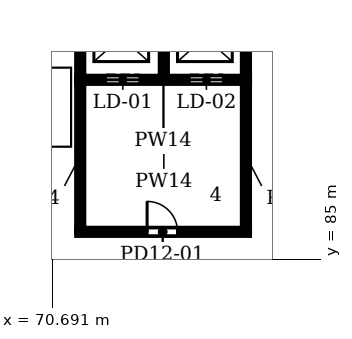
"""IFC4 building model, lengths in metres.
Left out: names, types, materials, properties, quantities, classifications, styles, units other than length and angle.
Written with IfcOpenShell. Run it as: python <this file> out.ifc"""

import sys

from ifc_helpers import new_model, si_unit, direction, frame, frame_2d, origin, place, context, subcontext, project, spatial, rectangle, extrude, element, fill, save


model = new_model("IFC4")
c1 = context("Model", 3, precision=1e-05, world=origin(), true_north=direction((0.0, 1.0)))
c2 = subcontext(c1, "Body", "Model", "MODEL_VIEW")
j1 = project(units=[si_unit("LENGTHUNIT", "METRE"), si_unit("PLANEANGLEUNIT", "RADIAN")], contexts=[c1])
p1 = place(None, origin())
s1 = spatial("IfcSite", under=j1, at=p1, CompositionType="ELEMENT")
p2 = place(p1, origin())
s2 = spatial("IfcBuilding", under=s1, at=p2, CompositionType="ELEMENT")
p3 = place(p2, frame((0.0, 0.0, -9.0)))
s3 = spatial("IfcBuildingStorey", under=s2, at=p3, CompositionType="ELEMENT", Elevation=-9.0)
p4 = place(p3, frame((71.5, 90.9, -1.0), z_axis=(0.0, 0.0, 1.0), x_axis=(1.0, 0.0, 0.0)))
e1 = element("IfcWall", 1, at=p4, inside=s3, PredefinedType="SOLIDWALL", context=c2, shape_type="SweptSolid", body=[
    extrude(rectangle(XDim=5.65, YDim=0.2, at=frame_2d((2.825, 0.0))), origin(), (0.0, 0.0, 1.0), 5.1),
])
p5 = place(p4, frame((0.95, 0.0, 1.0)))
e2 = element("IfcOpeningElement", 2, at=p5, cuts=e1, PredefinedType="OPENING", context=c2, shape_type="SweptSolid", body=[
    extrude(rectangle(XDim=1.1, YDim=2.1, at=frame_2d((0.55, 1.05))), frame((0.0, 0.11, 0.0), z_axis=(0.0, -1.0, 0.0), x_axis=(1.0, 0.0, 0.0)), (0.0, 0.0, 1.0), 0.22),
])
p6 = place(p4, frame((3.7, 0.0, 1.0)))
e3 = element("IfcOpeningElement", 3, at=p6, cuts=e1, PredefinedType="OPENING", context=c2, shape_type="SweptSolid", body=[
    extrude(rectangle(XDim=1.1, YDim=2.1, at=frame_2d((0.55, 1.05))), frame((0.0, 0.11, 0.0), z_axis=(0.0, -1.0, 0.0), x_axis=(1.0, 0.0, 0.0)), (0.0, 0.0, 1.0), 0.22),
])
for number, where, z_axis, x_axis in (
    (4, (71.6, 90.9, -1.0), (0.0, 0.0, 1.0), (0.0, 1.0, 0.0)),
    (5, (74.35, 90.9, -1.0), (0.0, 0.0, 1.0), (0.0, 1.0, 0.0)),
    (6, (77.05, 90.9, -1.0), (0.0, 0.0, 1.0), (0.0, 1.0, 0.0)),
):
    element("IfcWall", number, at=place(p3, frame(where, z_axis=z_axis, x_axis=x_axis)), inside=s3, PredefinedType="SOLIDWALL", context=c2, shape_type="SweptSolid", body=[
        extrude(rectangle(XDim=2.8, YDim=0.2, at=frame_2d((1.4, 0.0))), origin(), (0.0, 0.0, 1.0), 5.1),
    ])
for number, where, z_axis, x_axis in (
    (7, (71.6, 85.9, 0.0), (0.0, 0.0, 1.0), (0.0, 1.0, 0.0)),
    (8, (77.05, 85.9, 0.0), (0.0, 0.0, 1.0), (0.0, 1.0, 0.0)),
):
    element("IfcWall", number, at=place(p3, frame(where, z_axis=z_axis, x_axis=x_axis)), inside=s3, PredefinedType="PARTITIONING", context=c2, shape_type="SweptSolid", body=[
        extrude(rectangle(XDim=5.0, YDim=0.2, at=frame_2d((2.5, 0.0))), origin(), (0.0, 0.0, 1.0), 4.1),
    ])
p7 = place(p3, frame((71.5, 85.9, 0.0), z_axis=(0.0, 0.0, 1.0), x_axis=(1.0, 0.0, 0.0)))
e9 = element("IfcWall", 9, at=p7, inside=s3, PredefinedType="PARTITIONING", context=c2, shape_type="SweptSolid", body=[
    extrude(rectangle(XDim=5.65, YDim=0.2, at=frame_2d((2.825, 0.0))), origin(), (0.0, 0.0, 1.0), 4.1),
])
p8 = place(p7, frame((2.3, 0.0, 0.0)))
e10 = element("IfcOpeningElement", 10, at=p8, cuts=e9, PredefinedType="OPENING", context=c2, shape_type="SweptSolid", body=[
    extrude(rectangle(XDim=1.0, YDim=2.1, at=frame_2d((0.5, 1.05))), frame((0.0, 0.11, 0.0), z_axis=(0.0, -1.0, 0.0), x_axis=(1.0, 0.0, 0.0)), (0.0, 0.0, 1.0), 0.22),
])
p9 = place(p5, origin())
e11 = element("IfcDoor", 11, at=p9, inside=s3, OperationType="DOUBLE_DOOR_SLIDING", PredefinedType="DOOR", context=c2, shape_type="SweptSolid", body=[
    extrude(rectangle(XDim=1.1, YDim=2.1, at=frame_2d((0.55, 1.05))), frame((0.0, 0.025, 0.0), z_axis=(0.0, -1.0, 0.0), x_axis=(1.0, 0.0, 0.0)), (0.0, 0.0, 1.0), 0.05),
])
fill(e2, e11)
p10 = place(p6, origin())
e12 = element("IfcDoor", 12, at=p10, inside=s3, OperationType="DOUBLE_DOOR_SLIDING", PredefinedType="DOOR", context=c2, shape_type="SweptSolid", body=[
    extrude(rectangle(XDim=1.1, YDim=2.1, at=frame_2d((0.55, 1.05))), frame((0.0, 0.025, 0.0), z_axis=(0.0, -1.0, 0.0), x_axis=(1.0, 0.0, 0.0)), (0.0, 0.0, 1.0), 0.05),
])
fill(e3, e12)
p11 = place(p8, origin())
e13 = element("IfcDoor", 13, at=p11, inside=s3, OperationType="SINGLE_SWING_LEFT", PredefinedType="DOOR", context=c2, shape_type="SweptSolid", body=[
    extrude(rectangle(XDim=1.0, YDim=2.1, at=frame_2d((0.5, 1.05))), frame((0.0, 0.025, 0.0), z_axis=(0.0, -1.0, 0.0), x_axis=(1.0, 0.0, 0.0)), (0.0, 0.0, 1.0), 0.05),
])
fill(e10, e13)
save(model, sys.argv[1])
